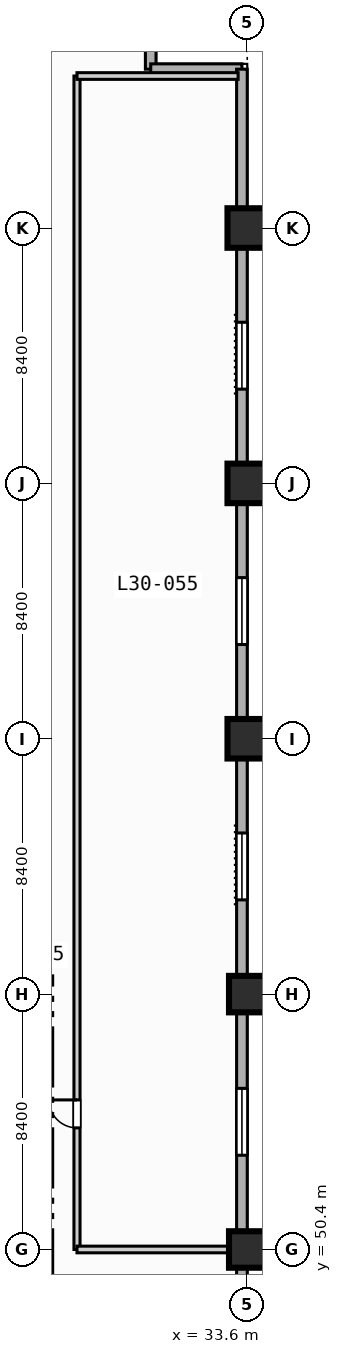
"""IFC4 building model, lengths in metres.
Left out: names, types, materials, properties, quantities, classifications, styles, units other than length and angle.
Written with IfcOpenShell. Run it as: python <this file> out.ifc"""

import sys

from ifc_helpers import new_model, si_unit, direction, frame, frame_2d, origin, origin_2d, place, context, subcontext, project, spatial, rectangle, extrude, element, fill, save


model = new_model("IFC4")
c1 = context("Model", 3, precision=1e-05, world=origin(), true_north=direction((0.0, 1.0)))
c2 = subcontext(c1, "Body", "Model", "MODEL_VIEW")
j1 = project(units=[si_unit("LENGTHUNIT", "METRE"), si_unit("PLANEANGLEUNIT", "RADIAN")], contexts=[c1])
p1 = place(None, origin())
s1 = spatial("IfcSite", under=j1, at=p1, CompositionType="ELEMENT")
p2 = place(p1, origin())
s2 = spatial("IfcBuilding", under=s1, at=p2, CompositionType="ELEMENT")
p3 = place(p2, frame((0.0, 0.0, 126.6)))
s3 = spatial("IfcBuildingStorey", under=s2, at=p3, CompositionType="ELEMENT", Elevation=126.6)
for number, where, z_axis, x_axis in (
    (1, (33.6, 50.4, 0.0), (0.0, 0.0, 1.0), (1.0, 0.0, 0.0)),
    (2, (33.6, 58.8, 0.0), (0.0, 0.0, 1.0), (1.0, 0.0, 0.0)),
):
    element("IfcColumn", number, at=place(p3, frame(where, z_axis=z_axis, x_axis=x_axis)), inside=s3, PredefinedType="COLUMN", context=c2, shape_type="SweptSolid", body=[
        extrude(rectangle(XDim=1.2, YDim=1.2, at=origin_2d()), origin(), (0.0, 0.0, 1.0), 3.8),
    ])
for number, where, z_axis, x_axis in (
    (3, (33.6, 67.2, 0.0), (0.0, 0.0, 1.0), (1.0, 0.0, 0.0)),
    (4, (33.6, 75.6, 0.0), (0.0, 0.0, 1.0), (1.0, 0.0, 0.0)),
    (5, (33.6, 84.0, 0.0), (0.0, 0.0, 1.0), (1.0, 0.0, 0.0)),
):
    element("IfcColumn", number, at=place(p3, frame(where, z_axis=z_axis, x_axis=x_axis)), inside=s3, PredefinedType="COLUMN", context=c2, shape_type="SweptSolid", body=[
        extrude(rectangle(XDim=1.3, YDim=1.3, at=origin_2d()), origin(), (0.0, 0.0, 1.0), 3.8),
    ])
for number, where, z_axis, x_axis in (
    (6, (30.425, 92.225, 0.0), (0.0, 0.0, 1.0), (0.0, -1.0, 0.0)),
    (7, (30.425, 89.225, 0.0), (0.0, 0.0, 1.0), (1.0, 0.0, 0.0)),
):
    element("IfcWall", number, at=place(p3, frame(where, z_axis=z_axis, x_axis=x_axis)), inside=s3, PredefinedType="STANDARD", context=c2, shape_type="SweptSolid", body=[
        extrude(rectangle(XDim=3.0, YDim=0.35, at=frame_2d((1.5, 0.0))), origin(), (0.0, 0.0, 1.0), 3.55),
    ])
p4 = place(p3, frame((33.425, 89.225, 0.0), z_axis=(0.0, 0.0, 1.0), x_axis=(0.0, -1.0, 0.0)))
e8 = element("IfcWall", 8, at=p4, inside=s3, PredefinedType="STANDARD", context=c2, shape_type="SweptSolid", body=[
    extrude(rectangle(XDim=55.8, YDim=0.35, at=frame_2d((27.9, 0.0))), origin(), (0.0, 0.0, 1.0), 3.55),
])
p5 = place(p4, frame((50.325, 0.0, 0.85)))
e9 = element("IfcOpeningElement", 9, at=p5, cuts=e8, PredefinedType="OPENING", context=c2, shape_type="SweptSolid", body=[
    extrude(rectangle(XDim=2.2, YDim=1.8, at=frame_2d((1.1, 0.9))), frame((0.0, 0.185, 0.0), z_axis=(0.0, -1.0, 0.0), x_axis=(1.0, 0.0, 0.0)), (0.0, 0.0, 1.0), 0.37),
])
p6 = place(p4, frame((33.525, 0.0, 0.85)))
e10 = element("IfcOpeningElement", 10, at=p6, cuts=e8, PredefinedType="OPENING", context=c2, shape_type="SweptSolid", body=[
    extrude(rectangle(XDim=2.2, YDim=1.8, at=frame_2d((1.1, 0.9))), frame((0.0, 0.185, 0.0), z_axis=(0.0, -1.0, 0.0), x_axis=(1.0, 0.0, 0.0)), (0.0, 0.0, 1.0), 0.37),
])
p7 = place(p4, frame((25.125, 0.0, 0.85)))
e11 = element("IfcOpeningElement", 11, at=p7, cuts=e8, PredefinedType="OPENING", context=c2, shape_type="SweptSolid", body=[
    extrude(rectangle(XDim=2.2, YDim=1.8, at=frame_2d((1.1, 0.9))), frame((0.0, 0.185, 0.0), z_axis=(0.0, -1.0, 0.0), x_axis=(1.0, 0.0, 0.0)), (0.0, 0.0, 1.0), 0.37),
])
p8 = place(p4, frame((16.725, 0.0, 0.85)))
e12 = element("IfcOpeningElement", 12, at=p8, cuts=e8, PredefinedType="OPENING", context=c2, shape_type="SweptSolid", body=[
    extrude(rectangle(XDim=2.2, YDim=1.8, at=frame_2d((1.1, 0.9))), frame((0.0, 0.185, 0.0), z_axis=(0.0, -1.0, 0.0), x_axis=(1.0, 0.0, 0.0)), (0.0, 0.0, 1.0), 0.37),
])
p9 = place(p4, frame((8.325, 0.0, 0.85)))
e13 = element("IfcOpeningElement", 13, at=p9, cuts=e8, PredefinedType="OPENING", context=c2, shape_type="SweptSolid", body=[
    extrude(rectangle(XDim=2.2, YDim=1.8, at=frame_2d((1.1, 0.9))), frame((0.0, 0.185, 0.0), z_axis=(0.0, -1.0, 0.0), x_axis=(1.0, 0.0, 0.0)), (0.0, 0.0, 1.0), 0.37),
])
p10 = place(p3, frame((28.0, 50.4, 0.0), z_axis=(0.0, 0.0, 1.0), x_axis=(0.0, 1.0, 0.0)))
e14 = element("IfcWall", 14, at=p10, inside=s3, PredefinedType="PARTITIONING", context=c2, shape_type="SweptSolid", body=[
    extrude(rectangle(XDim=38.6, YDim=0.2, at=frame_2d((19.3, 0.0))), origin(), (0.0, 0.0, 1.0), 3.55),
])
p11 = place(p10, frame((4.0, 0.0, 0.0)))
e15 = element("IfcOpeningElement", 15, at=p11, cuts=e14, PredefinedType="OPENING", context=c2, shape_type="SweptSolid", body=[
    extrude(rectangle(XDim=0.92, YDim=2.1, at=frame_2d((0.46, 1.05))), frame((0.0, 0.11, 0.0), z_axis=(0.0, -1.0, 0.0), x_axis=(1.0, 0.0, 0.0)), (0.0, 0.0, 1.0), 0.22),
])
p12 = place(p3, frame((28.0, 50.4, 0.0), z_axis=(0.0, 0.0, 1.0), x_axis=(1.0, 0.0, 0.0)))
e16 = element("IfcWall", 16, at=p12, inside=s3, PredefinedType="PARTITIONING", context=c2, shape_type="SweptSolid", body=[
    extrude(rectangle(XDim=5.3, YDim=0.22, at=frame_2d((2.65, 0.0))), origin(), (0.0, 0.0, 1.0), 3.087),
])
p13 = place(p3, frame((28.0, 89.0, 0.0), z_axis=(0.0, 0.0, 1.0), x_axis=(1.0, 0.0, 0.0)))
e17 = element("IfcWall", 17, at=p13, inside=s3, PredefinedType="PARTITIONING", context=c2, shape_type="SweptSolid", body=[
    extrude(rectangle(XDim=5.3, YDim=0.22, at=frame_2d((2.65, 0.0))), origin(), (0.0, 0.0, 1.0), 3.55),
])
p14 = place(p6, origin())
e18 = element("IfcWindow", 18, at=p14, inside=s3, PartitioningType="SINGLE_PANEL", PredefinedType="WINDOW", context=c2, shape_type="SweptSolid", body=[
    extrude(rectangle(XDim=2.2, YDim=1.8, at=frame_2d((1.1, 0.9))), frame((0.0, 0.03, 0.0), z_axis=(0.0, -1.0, 0.0), x_axis=(1.0, 0.0, 0.0)), (0.0, 0.0, 1.0), 0.06),
])
fill(e10, e18)
p15 = place(p7, origin())
e19 = element("IfcWindow", 19, at=p15, inside=s3, PartitioningType="SINGLE_PANEL", PredefinedType="WINDOW", context=c2, shape_type="SweptSolid", body=[
    extrude(rectangle(XDim=2.2, YDim=1.8, at=frame_2d((1.1, 0.9))), frame((0.0, 0.03, 0.0), z_axis=(0.0, -1.0, 0.0), x_axis=(1.0, 0.0, 0.0)), (0.0, 0.0, 1.0), 0.06),
])
fill(e11, e19)
p16 = place(p8, origin())
e20 = element("IfcWindow", 20, at=p16, inside=s3, PartitioningType="SINGLE_PANEL", PredefinedType="WINDOW", context=c2, shape_type="SweptSolid", body=[
    extrude(rectangle(XDim=2.2, YDim=1.8, at=frame_2d((1.1, 0.9))), frame((0.0, 0.03, 0.0), z_axis=(0.0, -1.0, 0.0), x_axis=(1.0, 0.0, 0.0)), (0.0, 0.0, 1.0), 0.06),
])
fill(e12, e20)
p17 = place(p9, origin())
e21 = element("IfcWindow", 21, at=p17, inside=s3, PartitioningType="SINGLE_PANEL", PredefinedType="WINDOW", context=c2, shape_type="SweptSolid", body=[
    extrude(rectangle(XDim=2.2, YDim=1.8, at=frame_2d((1.1, 0.9))), frame((0.0, 0.03, 0.0), z_axis=(0.0, -1.0, 0.0), x_axis=(1.0, 0.0, 0.0)), (0.0, 0.0, 1.0), 0.06),
])
fill(e13, e21)
p18 = place(p11, origin())
e22 = element("IfcDoor", 22, at=p18, inside=s3, OperationType="SINGLE_SWING_RIGHT", PredefinedType="DOOR", context=c2, shape_type="SweptSolid", body=[
    extrude(rectangle(XDim=0.92, YDim=2.1, at=frame_2d((0.46, 1.05))), frame((0.0, 0.025, 0.0), z_axis=(0.0, -1.0, 0.0), x_axis=(1.0, 0.0, 0.0)), (0.0, 0.0, 1.0), 0.05),
])
fill(e15, e22)
save(model, sys.argv[1])
